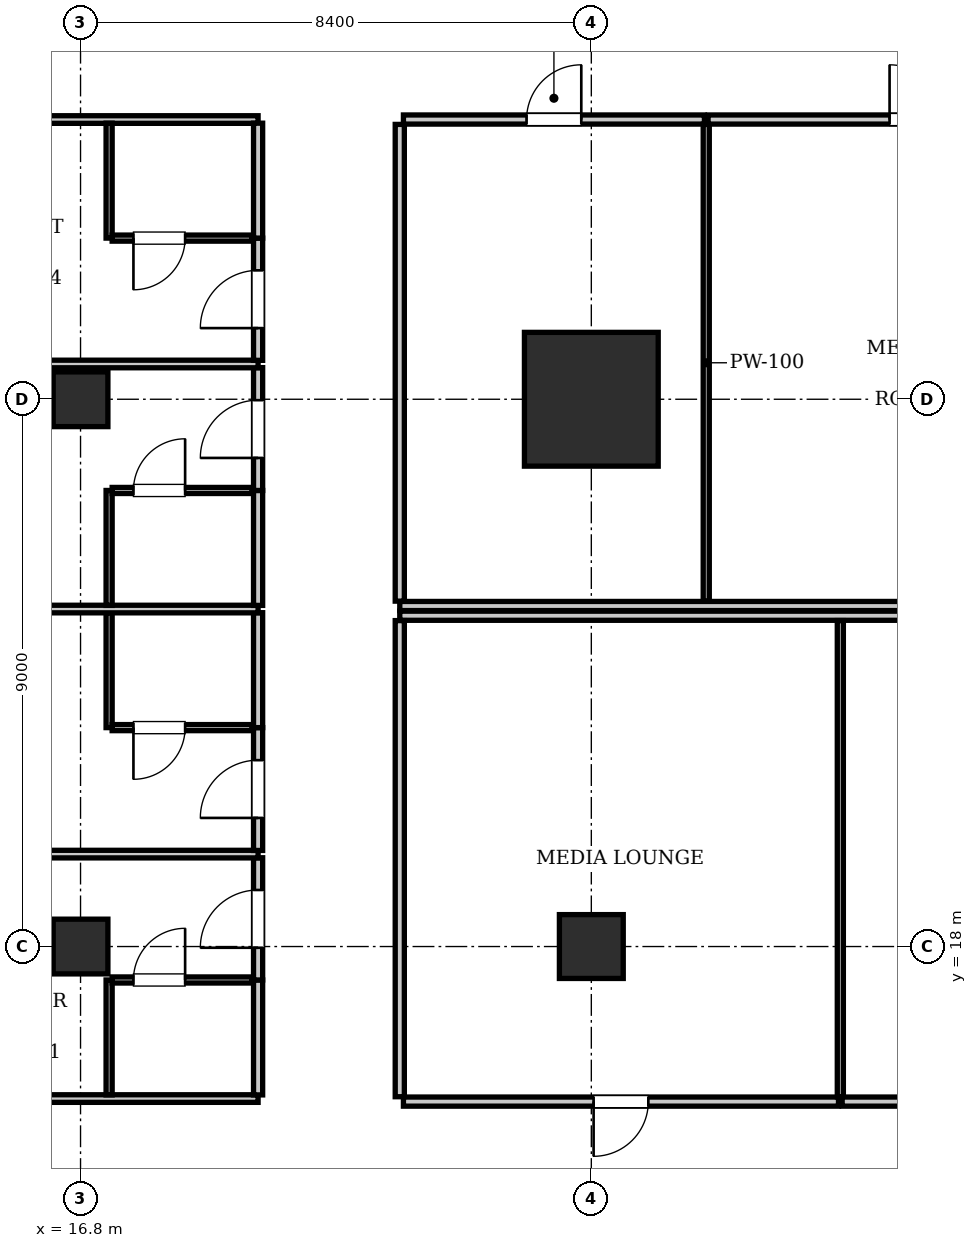
"""IFC4 building model, lengths in metres.
Left out: names, types, materials, properties, quantities, classifications, styles, units other than length and angle.
Written with IfcOpenShell. Run it as: python <this file> out.ifc"""

import sys

from ifc_helpers import new_model, si_unit, direction, frame, frame_2d, origin, origin_2d, place, context, subcontext, project, spatial, rectangle, extrude, element, fill, save


model = new_model("IFC4")
c1 = context("Model", 3, precision=1e-05, world=origin(), true_north=direction((0.0, 1.0)))
c2 = subcontext(c1, "Body", "Model", "MODEL_VIEW")
j1 = project(units=[si_unit("LENGTHUNIT", "METRE"), si_unit("PLANEANGLEUNIT", "RADIAN")], contexts=[c1])
p1 = place(None, origin())
s1 = spatial("IfcSite", under=j1, at=p1, CompositionType="ELEMENT")
p2 = place(p1, origin())
s2 = spatial("IfcBuilding", under=s1, at=p2, CompositionType="ELEMENT")
p3 = place(p2, frame((0.0, 0.0, 84.7)))
s3 = spatial("IfcBuildingStorey", under=s2, at=p3, CompositionType="ELEMENT", Elevation=84.7)
p4 = place(p3, frame((25.2, 27.0, 0.0), z_axis=(0.0, 0.0, 1.0), x_axis=(1.0, 0.0, 0.0)))
e1 = element("IfcColumn", 1, at=p4, inside=s3, PredefinedType="COLUMN", context=c2, shape_type="SweptSolid", body=[
    extrude(rectangle(XDim=2.2, YDim=2.2, at=origin_2d()), origin(), (0.0, 0.0, 1.0), 3.85),
])
p5 = place(p3, frame((25.2, 18.0, 0.0), z_axis=(0.0, 0.0, 1.0), x_axis=(1.0, 0.0, 0.0)))
e2 = element("IfcColumn", 2, at=p5, inside=s3, PredefinedType="COLUMN", context=c2, shape_type="SweptSolid", body=[
    extrude(rectangle(XDim=1.05, YDim=1.05, at=origin_2d()), origin(), (0.0, 0.0, 1.0), 3.85),
])
for number, where, z_axis, x_axis in (
    (3, (16.8, 18.0, 0.0), (0.0, 0.0, 1.0), (1.0, 0.0, 0.0)),
    (4, (16.8, 27.0, 0.0), (0.0, 0.0, 1.0), (1.0, 0.0, 0.0)),
):
    element("IfcColumn", number, at=place(p3, frame(where, z_axis=z_axis, x_axis=x_axis)), inside=s3, PredefinedType="COLUMN", context=c2, shape_type="SweptSolid", body=[
        extrude(rectangle(XDim=0.9, YDim=0.9, at=origin_2d()), origin(), (0.0, 0.0, 1.0), 3.85),
    ])
p6 = place(p3, frame((22.05, 23.6, 0.0), z_axis=(0.0, 0.0, 1.0), x_axis=(1.0, 0.0, 0.0)))
e5 = element("IfcWall", 5, at=p6, inside=s3, PredefinedType="PARTITIONING", context=c2, shape_type="SweptSolid", body=[
    extrude(rectangle(XDim=31.5, YDim=0.15, at=frame_2d((15.75, 0.0))), origin(), (0.0, 0.0, 1.0), 3.61),
])
p7 = place(p3, frame((22.05, 23.68, 0.0), z_axis=(0.0, 0.0, 1.0), x_axis=(0.0, 1.0, 0.0)))
e6 = element("IfcWall", 6, at=p7, inside=s3, PredefinedType="PARTITIONING", context=c2, shape_type="SweptSolid", body=[
    extrude(rectangle(XDim=7.84, YDim=0.15, at=frame_2d((3.92, 0.0))), origin(), (0.0, 0.0, 1.0), 3.61),
])
p8 = place(p3, frame((22.11, 31.6, 0.0), z_axis=(0.0, 0.0, 1.0), x_axis=(1.0, 0.0, 0.0)))
e7 = element("IfcWall", 7, at=p8, inside=s3, PredefinedType="PARTITIONING", context=c2, shape_type="SweptSolid", body=[
    extrude(rectangle(XDim=4.95, YDim=0.15, at=frame_2d((2.475, 0.0))), origin(), (0.0, 0.0, 1.0), 3.61),
])
p9 = place(p8, frame((2.025, 0.0, 0.0)))
e8 = element("IfcOpeningElement", 8, at=p9, cuts=e7, PredefinedType="OPENING", context=c2, shape_type="SweptSolid", body=[
    extrude(rectangle(XDim=0.9, YDim=2.1, at=frame_2d((0.45, 1.05))), frame((0.0, 0.085, 0.0), z_axis=(0.0, -1.0, 0.0), x_axis=(1.0, 0.0, 0.0)), (0.0, 0.0, 1.0), 0.17),
])
p10 = place(p3, frame((27.09, 23.68, 0.0), z_axis=(0.0, 0.0, 1.0), x_axis=(0.0, 1.0, 0.0)))
e9 = element("IfcWall", 9, at=p10, inside=s3, PredefinedType="PARTITIONING", context=c2, shape_type="SweptSolid", body=[
    extrude(rectangle(XDim=7.84, YDim=0.1, at=frame_2d((3.92, 0.0))), origin(), (0.0, 0.0, 1.0), 3.61),
])
p11 = place(p3, frame((27.12, 31.6, 0.0), z_axis=(0.0, 0.0, 1.0), x_axis=(1.0, 0.0, 0.0)))
e10 = element("IfcWall", 10, at=p11, inside=s3, PredefinedType="PARTITIONING", context=c2, shape_type="SweptSolid", body=[
    extrude(rectangle(XDim=6.87, YDim=0.15, at=frame_2d((3.435, 0.0))), origin(), (0.0, 0.0, 1.0), 3.61),
])
p12 = place(p11, frame((2.985, 0.0, 0.0)))
e11 = element("IfcOpeningElement", 11, at=p12, cuts=e10, PredefinedType="OPENING", context=c2, shape_type="SweptSolid", body=[
    extrude(rectangle(XDim=0.9, YDim=2.1, at=frame_2d((0.45, 1.05))), frame((0.0, 0.085, 0.0), z_axis=(0.0, -1.0, 0.0), x_axis=(1.0, 0.0, 0.0)), (0.0, 0.0, 1.0), 0.17),
])
p13 = place(p3, frame((22.05, 23.44, 0.0), z_axis=(0.0, 0.0, 1.0), x_axis=(1.0, 0.0, 0.0)))
e12 = element("IfcWall", 12, at=p13, inside=s3, PredefinedType="PARTITIONING", context=c2, shape_type="SweptSolid", body=[
    extrude(rectangle(XDim=31.5, YDim=0.15, at=frame_2d((15.75, 0.0))), origin(), (0.0, 0.0, 1.0), 3.61),
])
p14 = place(p3, frame((22.05, 15.53, 0.0), z_axis=(0.0, 0.0, 1.0), x_axis=(0.0, 1.0, 0.0)))
e13 = element("IfcWall", 13, at=p14, inside=s3, PredefinedType="PARTITIONING", context=c2, shape_type="SweptSolid", body=[
    extrude(rectangle(XDim=7.83, YDim=0.15, at=frame_2d((3.915, 0.0))), origin(), (0.0, 0.0, 1.0), 3.61),
])
p15 = place(p3, frame((22.11, 15.45, 0.0), z_axis=(0.0, 0.0, 1.0), x_axis=(1.0, 0.0, 0.0)))
e14 = element("IfcWall", 14, at=p15, inside=s3, PredefinedType="PARTITIONING", context=c2, shape_type="SweptSolid", body=[
    extrude(rectangle(XDim=7.155, YDim=0.15, at=frame_2d((3.577, 0.0))), origin(), (0.0, 0.0, 1.0), 3.61),
])
p16 = place(p15, frame((3.127, 0.0, 0.0)))
e15 = element("IfcOpeningElement", 15, at=p16, cuts=e14, PredefinedType="OPENING", context=c2, shape_type="SweptSolid", body=[
    extrude(rectangle(XDim=0.9, YDim=2.1, at=frame_2d((0.45, 1.05))), frame((0.0, 0.085, 0.0), z_axis=(0.0, -1.0, 0.0), x_axis=(1.0, 0.0, 0.0)), (0.0, 0.0, 1.0), 0.17),
])
p17 = place(p3, frame((29.295, 15.53, 0.0), z_axis=(0.0, 0.0, 1.0), x_axis=(0.0, 1.0, 0.0)))
e16 = element("IfcWall", 16, at=p17, inside=s3, PredefinedType="PARTITIONING", context=c2, shape_type="SweptSolid", body=[
    extrude(rectangle(XDim=7.83, YDim=0.1, at=frame_2d((3.915, 0.0))), origin(), (0.0, 0.0, 1.0), 3.255),
])
p18 = place(p3, frame((29.325, 15.45, 0.0), z_axis=(0.0, 0.0, 1.0), x_axis=(1.0, 0.0, 0.0)))
e17 = element("IfcWall", 17, at=p18, inside=s3, PredefinedType="PARTITIONING", context=c2, shape_type="SweptSolid", body=[
    extrude(rectangle(XDim=10.65, YDim=0.15, at=frame_2d((5.325, 0.0))), origin(), (0.0, 0.0, 1.0), 3.61),
])
p19 = place(p18, frame((4.875, 0.0, 0.0)))
e18 = element("IfcOpeningElement", 18, at=p19, cuts=e17, PredefinedType="OPENING", context=c2, shape_type="SweptSolid", body=[
    extrude(rectangle(XDim=0.9, YDim=2.1, at=frame_2d((0.45, 1.05))), frame((0.0, 0.085, 0.0), z_axis=(0.0, -1.0, 0.0), x_axis=(1.0, 0.0, 0.0)), (0.0, 0.0, 1.0), 0.17),
])
for number, where, z_axis, x_axis in (
    (19, (10.9, 15.5, 0.0), (0.0, 0.0, 1.0), (1.0, 0.0, 0.0)),
    (20, (10.9, 31.6, 0.0), (0.0, 0.0, 1.0), (1.0, 0.0, 0.0)),
):
    element("IfcWall", number, at=place(p3, frame(where, z_axis=z_axis, x_axis=x_axis)), inside=s3, PredefinedType="PARTITIONING", context=c2, shape_type="SweptSolid", body=[
        extrude(rectangle(XDim=8.82, YDim=0.125, at=frame_2d((4.41, 0.0))), origin(), (0.0, 0.0, 1.0), 3.61),
    ])
p20 = place(p3, frame((19.72, 15.56, 0.0), z_axis=(0.0, 0.0, 1.0), x_axis=(0.0, 1.0, 0.0)))
e21 = element("IfcWall", 21, at=p20, inside=s3, PredefinedType="PARTITIONING", context=c2, shape_type="SweptSolid", body=[
    extrude(rectangle(XDim=1.89, YDim=0.15, at=frame_2d((0.945, 0.0))), origin(), (0.0, 0.0, 1.0), 3.61),
])
p21 = place(p3, frame((19.72, 17.45, 0.0), z_axis=(0.0, 0.0, 1.0), x_axis=(0.0, 1.0, 0.0)))
e22 = element("IfcWall", 22, at=p21, inside=s3, PredefinedType="PARTITIONING", context=c2, shape_type="SweptSolid", body=[
    extrude(rectangle(XDim=2.01, YDim=0.15, at=frame_2d((1.005, 0.0))), origin(), (0.0, 0.0, 1.0), 3.61),
])
p22 = place(p21, frame((0.53, 0.0, 0.0)))
e23 = element("IfcOpeningElement", 23, at=p22, cuts=e22, PredefinedType="OPENING", context=c2, shape_type="SweptSolid", body=[
    extrude(rectangle(XDim=0.95, YDim=2.15, at=frame_2d((0.475, 1.075))), frame((0.0, 0.085, 0.0), z_axis=(0.0, -1.0, 0.0), x_axis=(1.0, 0.0, 0.0)), (0.0, 0.0, 1.0), 0.17),
])
p23 = place(p3, frame((17.27, 15.56, 0.0), z_axis=(0.0, 0.0, 1.0), x_axis=(0.0, 1.0, 0.0)))
e24 = element("IfcWall", 24, at=p23, inside=s3, PredefinedType="PARTITIONING", context=c2, shape_type="SweptSolid", body=[
    extrude(rectangle(XDim=1.89, YDim=0.1, at=frame_2d((0.945, 0.0))), origin(), (0.0, 0.0, 1.0), 3.61),
])
p24 = place(p3, frame((17.32, 17.45, 0.0), z_axis=(0.0, 0.0, 1.0), x_axis=(1.0, 0.0, 0.0)))
e25 = element("IfcWall", 25, at=p24, inside=s3, PredefinedType="PARTITIONING", context=c2, shape_type="SweptSolid", body=[
    extrude(rectangle(XDim=2.3, YDim=0.1, at=frame_2d((1.15, 0.0))), origin(), (0.0, 0.0, 1.0), 3.61),
])
p25 = place(p24, frame((0.35, 0.0, 0.0)))
e26 = element("IfcOpeningElement", 26, at=p25, cuts=e25, PredefinedType="OPENING", context=c2, shape_type="SweptSolid", body=[
    extrude(rectangle(XDim=0.85, YDim=2.1, at=frame_2d((0.425, 1.05))), frame((0.0, 0.06, 0.0), z_axis=(0.0, -1.0, 0.0), x_axis=(1.0, 0.0, 0.0)), (0.0, 0.0, 1.0), 0.12),
])
p26 = place(p3, frame((10.9, 19.52, 0.0), z_axis=(0.0, 0.0, 1.0), x_axis=(1.0, 0.0, 0.0)))
e27 = element("IfcWall", 27, at=p26, inside=s3, PredefinedType="PARTITIONING", context=c2, shape_type="SweptSolid", body=[
    extrude(rectangle(XDim=8.82, YDim=0.125, at=frame_2d((4.41, 0.0))), origin(), (0.0, 0.0, 1.0), 3.61),
])
p27 = place(p3, frame((19.72, 19.58, 0.0), z_axis=(0.0, 0.0, 1.0), x_axis=(0.0, 1.0, 0.0)))
e28 = element("IfcWall", 28, at=p27, inside=s3, PredefinedType="PARTITIONING", context=c2, shape_type="SweptSolid", body=[
    extrude(rectangle(XDim=2.02, YDim=0.15, at=frame_2d((1.01, 0.0))), origin(), (0.0, 0.0, 1.0), 3.61),
])
p28 = place(p27, frame((0.535, 0.0, 0.0)))
e29 = element("IfcOpeningElement", 29, at=p28, cuts=e28, PredefinedType="OPENING", context=c2, shape_type="SweptSolid", body=[
    extrude(rectangle(XDim=0.95, YDim=2.15, at=frame_2d((0.475, 1.075))), frame((0.0, 0.085, 0.0), z_axis=(0.0, -1.0, 0.0), x_axis=(1.0, 0.0, 0.0)), (0.0, 0.0, 1.0), 0.17),
])
p29 = place(p3, frame((19.72, 21.6, 0.0), z_axis=(0.0, 0.0, 1.0), x_axis=(0.0, 1.0, 0.0)))
e30 = element("IfcWall", 30, at=p29, inside=s3, PredefinedType="PARTITIONING", context=c2, shape_type="SweptSolid", body=[
    extrude(rectangle(XDim=1.89, YDim=0.15, at=frame_2d((0.945, 0.0))), origin(), (0.0, 0.0, 1.0), 3.61),
])
p30 = place(p3, frame((17.27, 21.6, 0.0), z_axis=(0.0, 0.0, 1.0), x_axis=(0.0, 1.0, 0.0)))
e31 = element("IfcWall", 31, at=p30, inside=s3, PredefinedType="PARTITIONING", context=c2, shape_type="SweptSolid", body=[
    extrude(rectangle(XDim=1.89, YDim=0.1, at=frame_2d((0.945, 0.0))), origin(), (0.0, 0.0, 1.0), 3.61),
])
p31 = place(p3, frame((17.32, 21.6, 0.0), z_axis=(0.0, 0.0, 1.0), x_axis=(1.0, 0.0, 0.0)))
e32 = element("IfcWall", 32, at=p31, inside=s3, PredefinedType="PARTITIONING", context=c2, shape_type="SweptSolid", body=[
    extrude(rectangle(XDim=2.3, YDim=0.1, at=frame_2d((1.15, 0.0))), origin(), (0.0, 0.0, 1.0), 3.61),
])
p32 = place(p31, frame((0.35, 0.0, 0.0)))
e33 = element("IfcOpeningElement", 33, at=p32, cuts=e32, PredefinedType="OPENING", context=c2, shape_type="SweptSolid", body=[
    extrude(rectangle(XDim=0.85, YDim=2.1, at=frame_2d((0.425, 1.05))), frame((0.0, 0.06, 0.0), z_axis=(0.0, -1.0, 0.0), x_axis=(1.0, 0.0, 0.0)), (0.0, 0.0, 1.0), 0.12),
])
p33 = place(p3, frame((10.9, 23.55, 0.0), z_axis=(0.0, 0.0, 1.0), x_axis=(1.0, 0.0, 0.0)))
e34 = element("IfcWall", 34, at=p33, inside=s3, PredefinedType="PARTITIONING", context=c2, shape_type="SweptSolid", body=[
    extrude(rectangle(XDim=8.82, YDim=0.125, at=frame_2d((4.41, 0.0))), origin(), (0.0, 0.0, 1.0), 3.61),
])
p34 = place(p3, frame((19.72, 23.61, 0.0), z_axis=(0.0, 0.0, 1.0), x_axis=(0.0, 1.0, 0.0)))
e35 = element("IfcWall", 35, at=p34, inside=s3, PredefinedType="PARTITIONING", context=c2, shape_type="SweptSolid", body=[
    extrude(rectangle(XDim=1.89, YDim=0.15, at=frame_2d((0.945, 0.0))), origin(), (0.0, 0.0, 1.0), 3.61),
])
p35 = place(p3, frame((19.72, 25.5, 0.0), z_axis=(0.0, 0.0, 1.0), x_axis=(0.0, 1.0, 0.0)))
e36 = element("IfcWall", 36, at=p35, inside=s3, PredefinedType="PARTITIONING", context=c2, shape_type="SweptSolid", body=[
    extrude(rectangle(XDim=2.02, YDim=0.15, at=frame_2d((1.01, 0.0))), origin(), (0.0, 0.0, 1.0), 3.61),
])
p36 = place(p35, frame((0.535, 0.0, 0.0)))
e37 = element("IfcOpeningElement", 37, at=p36, cuts=e36, PredefinedType="OPENING", context=c2, shape_type="SweptSolid", body=[
    extrude(rectangle(XDim=0.95, YDim=2.15, at=frame_2d((0.475, 1.075))), frame((0.0, 0.085, 0.0), z_axis=(0.0, -1.0, 0.0), x_axis=(1.0, 0.0, 0.0)), (0.0, 0.0, 1.0), 0.17),
])
p37 = place(p3, frame((17.27, 23.61, 0.0), z_axis=(0.0, 0.0, 1.0), x_axis=(0.0, 1.0, 0.0)))
e38 = element("IfcWall", 38, at=p37, inside=s3, PredefinedType="PARTITIONING", context=c2, shape_type="SweptSolid", body=[
    extrude(rectangle(XDim=1.89, YDim=0.1, at=frame_2d((0.945, 0.0))), origin(), (0.0, 0.0, 1.0), 3.61),
])
p38 = place(p3, frame((17.32, 25.5, 0.0), z_axis=(0.0, 0.0, 1.0), x_axis=(1.0, 0.0, 0.0)))
e39 = element("IfcWall", 39, at=p38, inside=s3, PredefinedType="PARTITIONING", context=c2, shape_type="SweptSolid", body=[
    extrude(rectangle(XDim=2.3, YDim=0.1, at=frame_2d((1.15, 0.0))), origin(), (0.0, 0.0, 1.0), 3.61),
])
p39 = place(p38, frame((0.35, 0.0, 0.0)))
e40 = element("IfcOpeningElement", 40, at=p39, cuts=e39, PredefinedType="OPENING", context=c2, shape_type="SweptSolid", body=[
    extrude(rectangle(XDim=0.85, YDim=2.1, at=frame_2d((0.425, 1.05))), frame((0.0, 0.06, 0.0), z_axis=(0.0, -1.0, 0.0), x_axis=(1.0, 0.0, 0.0)), (0.0, 0.0, 1.0), 0.12),
])
p40 = place(p3, frame((10.9, 27.58, 0.0), z_axis=(0.0, 0.0, 1.0), x_axis=(1.0, 0.0, 0.0)))
e41 = element("IfcWall", 41, at=p40, inside=s3, PredefinedType="PARTITIONING", context=c2, shape_type="SweptSolid", body=[
    extrude(rectangle(XDim=8.82, YDim=0.125, at=frame_2d((4.41, 0.0))), origin(), (0.0, 0.0, 1.0), 3.61),
])
p41 = place(p3, frame((19.72, 27.64, 0.0), z_axis=(0.0, 0.0, 1.0), x_axis=(0.0, 1.0, 0.0)))
e42 = element("IfcWall", 42, at=p41, inside=s3, PredefinedType="PARTITIONING", context=c2, shape_type="SweptSolid", body=[
    extrude(rectangle(XDim=2.01, YDim=0.15, at=frame_2d((1.005, 0.0))), origin(), (0.0, 0.0, 1.0), 3.61),
])
p42 = place(p41, frame((0.53, 0.0, 0.0)))
e43 = element("IfcOpeningElement", 43, at=p42, cuts=e42, PredefinedType="OPENING", context=c2, shape_type="SweptSolid", body=[
    extrude(rectangle(XDim=0.95, YDim=2.15, at=frame_2d((0.475, 1.075))), frame((0.0, 0.085, 0.0), z_axis=(0.0, -1.0, 0.0), x_axis=(1.0, 0.0, 0.0)), (0.0, 0.0, 1.0), 0.17),
])
p43 = place(p3, frame((19.72, 29.65, 0.0), z_axis=(0.0, 0.0, 1.0), x_axis=(0.0, 1.0, 0.0)))
e44 = element("IfcWall", 44, at=p43, inside=s3, PredefinedType="PARTITIONING", context=c2, shape_type="SweptSolid", body=[
    extrude(rectangle(XDim=1.89, YDim=0.15, at=frame_2d((0.945, 0.0))), origin(), (0.0, 0.0, 1.0), 3.61),
])
p44 = place(p3, frame((17.27, 29.65, 0.0), z_axis=(0.0, 0.0, 1.0), x_axis=(0.0, 1.0, 0.0)))
e45 = element("IfcWall", 45, at=p44, inside=s3, PredefinedType="PARTITIONING", context=c2, shape_type="SweptSolid", body=[
    extrude(rectangle(XDim=1.89, YDim=0.1, at=frame_2d((0.945, 0.0))), origin(), (0.0, 0.0, 1.0), 3.61),
])
p45 = place(p3, frame((17.32, 29.65, 0.0), z_axis=(0.0, 0.0, 1.0), x_axis=(1.0, 0.0, 0.0)))
e46 = element("IfcWall", 46, at=p45, inside=s3, PredefinedType="PARTITIONING", context=c2, shape_type="SweptSolid", body=[
    extrude(rectangle(XDim=2.3, YDim=0.1, at=frame_2d((1.15, 0.0))), origin(), (0.0, 0.0, 1.0), 3.61),
])
p46 = place(p45, frame((0.35, 0.0, 0.0)))
e47 = element("IfcOpeningElement", 47, at=p46, cuts=e46, PredefinedType="OPENING", context=c2, shape_type="SweptSolid", body=[
    extrude(rectangle(XDim=0.85, YDim=2.1, at=frame_2d((0.425, 1.05))), frame((0.0, 0.06, 0.0), z_axis=(0.0, -1.0, 0.0), x_axis=(1.0, 0.0, 0.0)), (0.0, 0.0, 1.0), 0.12),
])
p47 = place(p9, origin())
e48 = element("IfcDoor", 48, at=p47, inside=s3, OperationType="SINGLE_SWING_RIGHT", PredefinedType="DOOR", context=c2, shape_type="SweptSolid", body=[
    extrude(rectangle(XDim=0.9, YDim=2.1, at=frame_2d((0.45, 1.05))), frame((0.0, 0.025, 0.0), z_axis=(0.0, -1.0, 0.0), x_axis=(1.0, 0.0, 0.0)), (0.0, 0.0, 1.0), 0.05),
])
fill(e8, e48)
p48 = place(p12, origin())
e49 = element("IfcDoor", 49, at=p48, inside=s3, OperationType="SINGLE_SWING_LEFT", PredefinedType="DOOR", context=c2, shape_type="SweptSolid", body=[
    extrude(rectangle(XDim=0.9, YDim=2.1, at=frame_2d((0.45, 1.05))), frame((0.0, 0.025, 0.0), z_axis=(0.0, -1.0, 0.0), x_axis=(1.0, 0.0, 0.0)), (0.0, 0.0, 1.0), 0.05),
])
fill(e11, e49)
p49 = place(p16, frame((0.9, 0.0, 0.0), z_axis=(0.0, 0.0, 1.0), x_axis=(-1.0, 0.0, 0.0)))
e50 = element("IfcDoor", 50, at=p49, inside=s3, OperationType="SINGLE_SWING_RIGHT", PredefinedType="DOOR", context=c2, shape_type="SweptSolid", body=[
    extrude(rectangle(XDim=0.9, YDim=2.1, at=frame_2d((0.45, 1.05))), frame((0.0, 0.025, 0.0), z_axis=(0.0, -1.0, 0.0), x_axis=(1.0, 0.0, 0.0)), (0.0, 0.0, 1.0), 0.05),
])
fill(e15, e50)
p50 = place(p25, origin())
e51 = element("IfcDoor", 51, at=p50, inside=s3, OperationType="SINGLE_SWING_RIGHT", PredefinedType="DOOR", context=c2, shape_type="SweptSolid", body=[
    extrude(rectangle(XDim=0.85, YDim=2.1, at=frame_2d((0.425, 1.05))), frame((0.0, 0.025, 0.0), z_axis=(0.0, -1.0, 0.0), x_axis=(1.0, 0.0, 0.0)), (0.0, 0.0, 1.0), 0.05),
])
fill(e26, e51)
p51 = place(p22, origin())
e52 = element("IfcDoor", 52, at=p51, inside=s3, OperationType="SINGLE_SWING_LEFT", PredefinedType="DOOR", context=c2, shape_type="SweptSolid", body=[
    extrude(rectangle(XDim=0.95, YDim=2.15, at=frame_2d((0.475, 1.075))), frame((0.0, 0.025, 0.0), z_axis=(0.0, -1.0, 0.0), x_axis=(1.0, 0.0, 0.0)), (0.0, 0.0, 1.0), 0.05),
])
fill(e23, e52)
p52 = place(p32, frame((0.85, 0.0, 0.0), z_axis=(0.0, 0.0, 1.0), x_axis=(-1.0, 0.0, 0.0)))
e53 = element("IfcDoor", 53, at=p52, inside=s3, OperationType="SINGLE_SWING_RIGHT", PredefinedType="DOOR", context=c2, shape_type="SweptSolid", body=[
    extrude(rectangle(XDim=0.85, YDim=2.1, at=frame_2d((0.425, 1.05))), frame((0.0, 0.025, 0.0), z_axis=(0.0, -1.0, 0.0), x_axis=(1.0, 0.0, 0.0)), (0.0, 0.0, 1.0), 0.05),
])
fill(e33, e53)
p53 = place(p28, origin())
e54 = element("IfcDoor", 54, at=p53, inside=s3, OperationType="SINGLE_SWING_LEFT", PredefinedType="DOOR", context=c2, shape_type="SweptSolid", body=[
    extrude(rectangle(XDim=0.95, YDim=2.15, at=frame_2d((0.475, 1.075))), frame((0.0, 0.025, 0.0), z_axis=(0.0, -1.0, 0.0), x_axis=(1.0, 0.0, 0.0)), (0.0, 0.0, 1.0), 0.05),
])
fill(e29, e54)
p54 = place(p39, origin())
e55 = element("IfcDoor", 55, at=p54, inside=s3, OperationType="SINGLE_SWING_RIGHT", PredefinedType="DOOR", context=c2, shape_type="SweptSolid", body=[
    extrude(rectangle(XDim=0.85, YDim=2.1, at=frame_2d((0.425, 1.05))), frame((0.0, 0.025, 0.0), z_axis=(0.0, -1.0, 0.0), x_axis=(1.0, 0.0, 0.0)), (0.0, 0.0, 1.0), 0.05),
])
fill(e40, e55)
p55 = place(p36, origin())
e56 = element("IfcDoor", 56, at=p55, inside=s3, OperationType="SINGLE_SWING_LEFT", PredefinedType="DOOR", context=c2, shape_type="SweptSolid", body=[
    extrude(rectangle(XDim=0.95, YDim=2.15, at=frame_2d((0.475, 1.075))), frame((0.0, 0.025, 0.0), z_axis=(0.0, -1.0, 0.0), x_axis=(1.0, 0.0, 0.0)), (0.0, 0.0, 1.0), 0.05),
])
fill(e37, e56)
p56 = place(p46, frame((0.85, 0.0, 0.0), z_axis=(0.0, 0.0, 1.0), x_axis=(-1.0, 0.0, 0.0)))
e57 = element("IfcDoor", 57, at=p56, inside=s3, OperationType="SINGLE_SWING_RIGHT", PredefinedType="DOOR", context=c2, shape_type="SweptSolid", body=[
    extrude(rectangle(XDim=0.85, YDim=2.1, at=frame_2d((0.425, 1.05))), frame((0.0, 0.025, 0.0), z_axis=(0.0, -1.0, 0.0), x_axis=(1.0, 0.0, 0.0)), (0.0, 0.0, 1.0), 0.05),
])
fill(e47, e57)
p57 = place(p42, origin())
e58 = element("IfcDoor", 58, at=p57, inside=s3, OperationType="SINGLE_SWING_LEFT", PredefinedType="DOOR", context=c2, shape_type="SweptSolid", body=[
    extrude(rectangle(XDim=0.95, YDim=2.15, at=frame_2d((0.475, 1.075))), frame((0.0, 0.025, 0.0), z_axis=(0.0, -1.0, 0.0), x_axis=(1.0, 0.0, 0.0)), (0.0, 0.0, 1.0), 0.05),
])
fill(e43, e58)
save(model, sys.argv[1])
